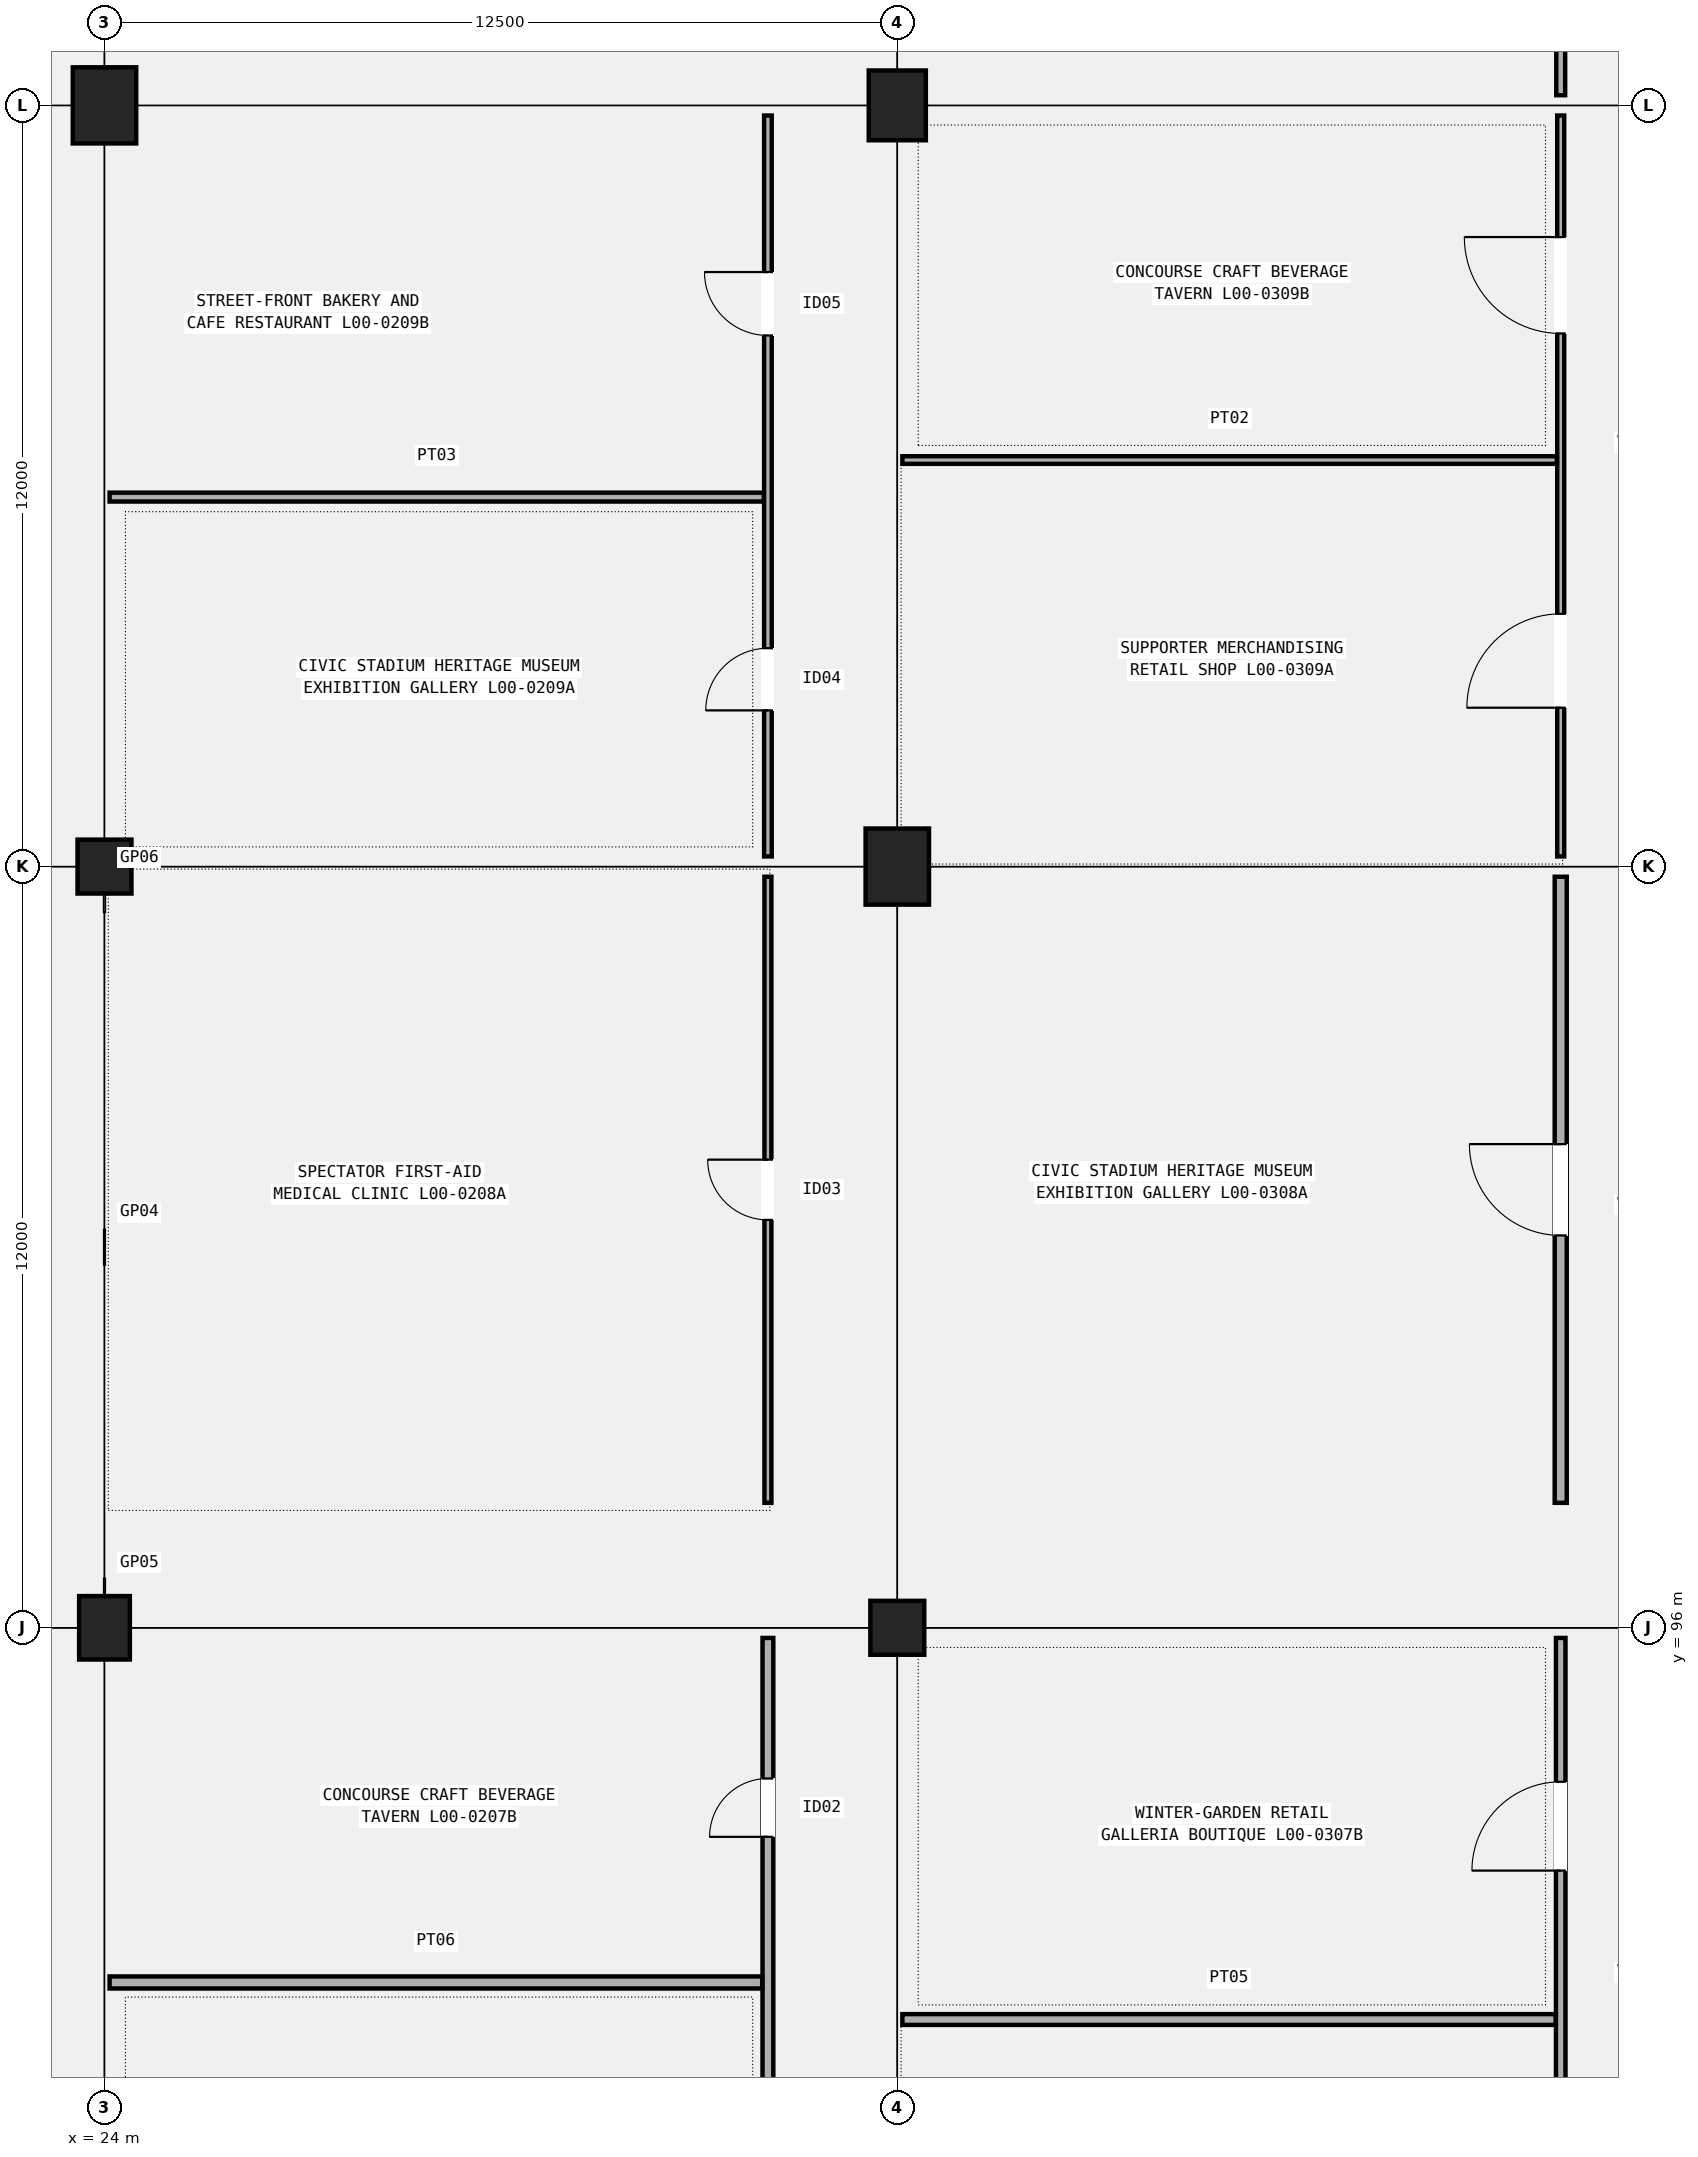
"""IFC4 building model, lengths in metres.
Left out: names, types, materials, properties, quantities, classifications, styles, units other than length and angle.
Written with IfcOpenShell. Run it as: python <this file> out.ifc"""

import sys

from ifc_helpers import new_model, si_unit, direction, frame, frame_2d, origin, origin_2d, place, context, subcontext, project, spatial, rectangle, circle, extrude, element, fill, save


model = new_model("IFC4")
c1 = context("Model", 3, precision=1e-05, world=origin(), true_north=direction((0.0, 1.0)))
c2 = subcontext(c1, "Body", "Model", "MODEL_VIEW")
j1 = project(units=[si_unit("LENGTHUNIT", "METRE"), si_unit("PLANEANGLEUNIT", "RADIAN")], contexts=[c1])
p1 = place(None, origin())
s1 = spatial("IfcSite", under=j1, at=p1, CompositionType="ELEMENT")
p2 = place(p1, origin())
s2 = spatial("IfcBuilding", under=s1, at=p2, CompositionType="ELEMENT")
p3 = place(p2, origin())
s3 = spatial("IfcBuildingStorey", under=s2, at=p3, CompositionType="ELEMENT", Elevation=0.0)
p4 = place(p3, frame((24.0, 96.0, 0.0), z_axis=(0.0, 0.0, 1.0), x_axis=(1.0, 0.0, 0.0)))
e1 = element("IfcColumn", 1, at=p4, inside=s3, PredefinedType="COLUMN", context=c2, shape_type="SweptSolid", body=[
    extrude(rectangle(XDim=0.8, YDim=1.0, at=origin_2d()), origin(), (0.0, 0.0, 1.0), 5.4),
])
p5 = place(p3, frame((24.0, 108.0, 0.0), z_axis=(0.0, 0.0, 1.0), x_axis=(1.0, 0.0, 0.0)))
e2 = element("IfcColumn", 2, at=p5, inside=s3, PredefinedType="COLUMN", context=c2, shape_type="SweptSolid", body=[
    extrude(circle(Radius=0.425, at=origin_2d()), origin(), (0.0, 0.0, 1.0), 5.4),
])
p6 = place(p3, frame((24.0, 120.0, 0.0), z_axis=(0.0, 0.0, 1.0), x_axis=(1.0, 0.0, 0.0)))
e3 = element("IfcColumn", 3, at=p6, inside=s3, PredefinedType="COLUMN", context=c2, shape_type="SweptSolid", body=[
    extrude(rectangle(XDim=1.0, YDim=1.2, at=origin_2d()), origin(), (0.0, 0.0, 1.0), 5.4),
])
p7 = place(p3, frame((36.5, 96.0, 0.0), z_axis=(0.0, 0.0, 1.0), x_axis=(1.0, 0.0, 0.0)))
e4 = element("IfcColumn", 4, at=p7, inside=s3, PredefinedType="COLUMN", context=c2, shape_type="SweptSolid", body=[
    extrude(circle(Radius=0.425, at=origin_2d()), origin(), (0.0, 0.0, 1.0), 5.4),
])
p8 = place(p3, frame((36.5, 108.0, 0.0), z_axis=(0.0, 0.0, 1.0), x_axis=(1.0, 0.0, 0.0)))
e5 = element("IfcColumn", 5, at=p8, inside=s3, PredefinedType="COLUMN", context=c2, shape_type="SweptSolid", body=[
    extrude(rectangle(XDim=1.0, YDim=1.2, at=origin_2d()), origin(), (0.0, 0.0, 1.0), 5.4),
])
p9 = place(p3, frame((36.5, 120.0, 0.0), z_axis=(0.0, 0.0, 1.0), x_axis=(1.0, 0.0, 0.0)))
e6 = element("IfcColumn", 6, at=p9, inside=s3, PredefinedType="COLUMN", context=c2, shape_type="SweptSolid", body=[
    extrude(rectangle(XDim=0.9, YDim=1.1, at=origin_2d()), origin(), (0.0, 0.0, 1.0), 5.4),
])
p10 = place(p3, frame((34.46, 84.16, 0.0), z_axis=(0.0, 0.0, 1.0), x_axis=(0.0, 1.0, 0.0)))
e7 = element("IfcWall", 7, at=p10, inside=s3, PredefinedType="PARTITIONING", context=c2, shape_type="SweptSolid", body=[
    extrude(rectangle(XDim=11.68, YDim=0.17, at=frame_2d((5.84, 0.0))), origin(), (0.0, 0.0, 1.0), 4.52),
])
p11 = place(p10, frame((2.635, 0.0, 0.0)))
e8 = element("IfcOpeningElement", 8, at=p11, cuts=e7, PredefinedType="OPENING", context=c2, shape_type="SweptSolid", body=[
    extrude(rectangle(XDim=0.9, YDim=2.06, at=frame_2d((0.45, 1.03))), frame((0.0, 0.095, 0.0), z_axis=(0.0, -1.0, 0.0), x_axis=(1.0, 0.0, 0.0)), (0.0, 0.0, 1.0), 0.19),
])
p12 = place(p10, frame((8.544, 0.0, 0.0)))
e9 = element("IfcOpeningElement", 9, at=p12, cuts=e7, PredefinedType="OPENING", context=c2, shape_type="SweptSolid", body=[
    extrude(rectangle(XDim=0.92, YDim=2.1, at=frame_2d((0.46, 1.05))), frame((0.0, 0.095, 0.0), z_axis=(0.0, -1.0, 0.0), x_axis=(1.0, 0.0, 0.0)), (0.0, 0.0, 1.0), 0.19),
])
p13 = place(p3, frame((24.08, 90.409, 0.0), z_axis=(0.0, 0.0, 1.0), x_axis=(1.0, 0.0, 0.0)))
e10 = element("IfcWall", 10, at=p13, inside=s3, PredefinedType="PARTITIONING", context=c2, shape_type="SweptSolid", body=[
    extrude(rectangle(XDim=10.29, YDim=0.19, at=frame_2d((5.145, 0.0))), origin(), (0.0, 0.0, 1.0), 4.52),
])
p14 = place(p3, frame((34.46, 97.97, 0.0), z_axis=(0.0, 0.0, 1.0), x_axis=(0.0, 1.0, 0.0)))
e11 = element("IfcWall", 11, at=p14, inside=s3, PredefinedType="PARTITIONING", context=c2, shape_type="SweptSolid", body=[
    extrude(rectangle(XDim=9.87, YDim=0.11, at=frame_2d((4.935, 0.0))), origin(), (0.0, 0.0, 1.0), 4.52),
])
p15 = place(p14, frame((4.46, 0.0, 0.0)))
e12 = element("IfcOpeningElement", 12, at=p15, cuts=e11, PredefinedType="OPENING", context=c2, shape_type="SweptSolid", body=[
    extrude(rectangle(XDim=0.95, YDim=2.12, at=frame_2d((0.475, 1.06))), frame((0.0, 0.065, 0.0), z_axis=(0.0, -1.0, 0.0), x_axis=(1.0, 0.0, 0.0)), (0.0, 0.0, 1.0), 0.13),
])
p16 = place(p3, frame((34.46, 108.16, 0.0), z_axis=(0.0, 0.0, 1.0), x_axis=(0.0, 1.0, 0.0)))
e13 = element("IfcWall", 13, at=p16, inside=s3, PredefinedType="PARTITIONING", context=c2, shape_type="SweptSolid", body=[
    extrude(rectangle(XDim=11.68, YDim=0.12, at=frame_2d((5.84, 0.0))), origin(), (0.0, 0.0, 1.0), 4.52),
])
p17 = place(p16, frame((2.302, 0.0, 0.0)))
e14 = element("IfcOpeningElement", 14, at=p17, cuts=e13, PredefinedType="OPENING", context=c2, shape_type="SweptSolid", body=[
    extrude(rectangle(XDim=0.98, YDim=2.1, at=frame_2d((0.49, 1.05))), frame((0.0, 0.07, 0.0), z_axis=(0.0, -1.0, 0.0), x_axis=(1.0, 0.0, 0.0)), (0.0, 0.0, 1.0), 0.14),
])
p18 = place(p16, frame((8.212, 0.0, 0.0)))
e15 = element("IfcOpeningElement", 15, at=p18, cuts=e13, PredefinedType="OPENING", context=c2, shape_type="SweptSolid", body=[
    extrude(rectangle(XDim=1.0, YDim=2.14, at=frame_2d((0.5, 1.07))), frame((0.0, 0.07, 0.0), z_axis=(0.0, -1.0, 0.0), x_axis=(1.0, 0.0, 0.0)), (0.0, 0.0, 1.0), 0.14),
])
p19 = place(p3, frame((24.08, 113.825, 0.0), z_axis=(0.0, 0.0, 1.0), x_axis=(1.0, 0.0, 0.0)))
e16 = element("IfcWall", 16, at=p19, inside=s3, PredefinedType="PARTITIONING", context=c2, shape_type="SweptSolid", body=[
    extrude(rectangle(XDim=10.315, YDim=0.14, at=frame_2d((5.157, 0.0))), origin(), (0.0, 0.0, 1.0), 4.52),
])
p20 = place(p3, frame((46.96, 84.16, 0.0), z_axis=(0.0, 0.0, 1.0), x_axis=(0.0, 1.0, 0.0)))
e17 = element("IfcWall", 17, at=p20, inside=s3, PredefinedType="PARTITIONING", context=c2, shape_type="SweptSolid", body=[
    extrude(rectangle(XDim=11.68, YDim=0.15, at=frame_2d((5.84, 0.0))), origin(), (0.0, 0.0, 1.0), 4.52),
])
p21 = place(p20, frame((2.112, 0.0, 0.0)))
e18 = element("IfcOpeningElement", 18, at=p21, cuts=e17, PredefinedType="OPENING", context=c2, shape_type="SweptSolid", body=[
    extrude(rectangle(XDim=1.36, YDim=2.25, at=frame_2d((0.68, 1.125))), frame((0.0, 0.085, 0.0), z_axis=(0.0, -1.0, 0.0), x_axis=(1.0, 0.0, 0.0)), (0.0, 0.0, 1.0), 0.17),
])
p22 = place(p20, frame((8.012, 0.0, 0.0)))
e19 = element("IfcOpeningElement", 19, at=p22, cuts=e17, PredefinedType="OPENING", context=c2, shape_type="SweptSolid", body=[
    extrude(rectangle(XDim=1.4, YDim=2.24, at=frame_2d((0.7, 1.12))), frame((0.0, 0.085, 0.0), z_axis=(0.0, -1.0, 0.0), x_axis=(1.0, 0.0, 0.0)), (0.0, 0.0, 1.0), 0.17),
])
p23 = place(p3, frame((36.58, 89.825, 0.0), z_axis=(0.0, 0.0, 1.0), x_axis=(1.0, 0.0, 0.0)))
e20 = element("IfcWall", 20, at=p23, inside=s3, PredefinedType="PARTITIONING", context=c2, shape_type="SweptSolid", body=[
    extrude(rectangle(XDim=10.3, YDim=0.17, at=frame_2d((5.15, 0.0))), origin(), (0.0, 0.0, 1.0), 4.52),
])
p24 = place(p3, frame((46.96, 97.97, 0.0), z_axis=(0.0, 0.0, 1.0), x_axis=(0.0, 1.0, 0.0)))
e21 = element("IfcWall", 21, at=p24, inside=s3, PredefinedType="PARTITIONING", context=c2, shape_type="SweptSolid", body=[
    extrude(rectangle(XDim=9.87, YDim=0.19, at=frame_2d((4.935, 0.0))), origin(), (0.0, 0.0, 1.0), 4.52),
])
p25 = place(p24, frame((4.215, 0.0, 0.0)))
e22 = element("IfcOpeningElement", 22, at=p25, cuts=e21, PredefinedType="OPENING", context=c2, shape_type="SweptSolid", body=[
    extrude(rectangle(XDim=1.44, YDim=2.26, at=frame_2d((0.72, 1.13))), frame((0.0, 0.105, 0.0), z_axis=(0.0, -1.0, 0.0), x_axis=(1.0, 0.0, 0.0)), (0.0, 0.0, 1.0), 0.21),
])
p26 = place(p3, frame((46.96, 108.16, 0.0), z_axis=(0.0, 0.0, 1.0), x_axis=(0.0, 1.0, 0.0)))
e23 = element("IfcWall", 23, at=p26, inside=s3, PredefinedType="PARTITIONING", context=c2, shape_type="SweptSolid", body=[
    extrude(rectangle(XDim=11.68, YDim=0.11, at=frame_2d((5.84, 0.0))), origin(), (0.0, 0.0, 1.0), 4.52),
])
p27 = place(p26, frame((2.344, 0.0, 0.0)))
e24 = element("IfcOpeningElement", 24, at=p27, cuts=e23, PredefinedType="OPENING", context=c2, shape_type="SweptSolid", body=[
    extrude(rectangle(XDim=1.48, YDim=2.24, at=frame_2d((0.74, 1.12))), frame((0.0, 0.065, 0.0), z_axis=(0.0, -1.0, 0.0), x_axis=(1.0, 0.0, 0.0)), (0.0, 0.0, 1.0), 0.13),
])
p28 = place(p26, frame((8.244, 0.0, 0.0)))
e25 = element("IfcOpeningElement", 25, at=p28, cuts=e23, PredefinedType="OPENING", context=c2, shape_type="SweptSolid", body=[
    extrude(rectangle(XDim=1.52, YDim=2.28, at=frame_2d((0.76, 1.14))), frame((0.0, 0.065, 0.0), z_axis=(0.0, -1.0, 0.0), x_axis=(1.0, 0.0, 0.0)), (0.0, 0.0, 1.0), 0.13),
])
p29 = place(p3, frame((36.58, 114.409, 0.0), z_axis=(0.0, 0.0, 1.0), x_axis=(1.0, 0.0, 0.0)))
e26 = element("IfcWall", 26, at=p29, inside=s3, PredefinedType="PARTITIONING", context=c2, shape_type="SweptSolid", body=[
    extrude(rectangle(XDim=10.32, YDim=0.12, at=frame_2d((5.16, 0.0))), origin(), (0.0, 0.0, 1.0), 4.52),
])
p30 = place(p3, frame((46.96, 120.16, 0.0), z_axis=(0.0, 0.0, 1.0), x_axis=(0.0, 1.0, 0.0)))
e27 = element("IfcWall", 27, at=p30, inside=s3, PredefinedType="PARTITIONING", context=c2, shape_type="SweptSolid", body=[
    extrude(rectangle(XDim=11.68, YDim=0.14, at=frame_2d((5.84, 0.0))), origin(), (0.0, 0.0, 1.0), 4.52),
])
p31 = place(p30, frame((5.06, 0.0, 0.0)))
e28 = element("IfcOpeningElement", 28, at=p31, cuts=e27, PredefinedType="OPENING", context=c2, shape_type="SweptSolid", body=[
    extrude(rectangle(XDim=1.56, YDim=2.26, at=frame_2d((0.78, 1.13))), frame((0.0, 0.08, 0.0), z_axis=(0.0, -1.0, 0.0), x_axis=(1.0, 0.0, 0.0)), (0.0, 0.0, 1.0), 0.16),
])
p32 = place(p12, origin())
e29 = element("IfcDoor", 29, at=p32, inside=s3, OperationType="SINGLE_SWING_LEFT", PredefinedType="DOOR", context=c2, shape_type="SweptSolid", body=[
    extrude(rectangle(XDim=0.92, YDim=2.1, at=frame_2d((0.46, 1.05))), frame((0.0, 0.025, 0.0), z_axis=(0.0, -1.0, 0.0), x_axis=(1.0, 0.0, 0.0)), (0.0, 0.0, 1.0), 0.05),
])
fill(e9, e29)
p33 = place(p15, origin())
e30 = element("IfcDoor", 30, at=p33, inside=s3, OperationType="SINGLE_SWING_RIGHT", PredefinedType="DOOR", context=c2, shape_type="SweptSolid", body=[
    extrude(rectangle(XDim=0.95, YDim=2.12, at=frame_2d((0.475, 1.06))), frame((0.0, 0.025, 0.0), z_axis=(0.0, -1.0, 0.0), x_axis=(1.0, 0.0, 0.0)), (0.0, 0.0, 1.0), 0.05),
])
fill(e12, e30)
p34 = place(p17, origin())
e31 = element("IfcDoor", 31, at=p34, inside=s3, OperationType="SINGLE_SWING_LEFT", PredefinedType="DOOR", context=c2, shape_type="SweptSolid", body=[
    extrude(rectangle(XDim=0.98, YDim=2.1, at=frame_2d((0.49, 1.05))), frame((0.0, 0.025, 0.0), z_axis=(0.0, -1.0, 0.0), x_axis=(1.0, 0.0, 0.0)), (0.0, 0.0, 1.0), 0.05),
])
fill(e14, e31)
p35 = place(p18, origin())
e32 = element("IfcDoor", 32, at=p35, inside=s3, OperationType="SINGLE_SWING_RIGHT", PredefinedType="DOOR", context=c2, shape_type="SweptSolid", body=[
    extrude(rectangle(XDim=1.0, YDim=2.14, at=frame_2d((0.5, 1.07))), frame((0.0, 0.025, 0.0), z_axis=(0.0, -1.0, 0.0), x_axis=(1.0, 0.0, 0.0)), (0.0, 0.0, 1.0), 0.05),
])
fill(e15, e32)
p36 = place(p22, origin())
e33 = element("IfcDoor", 33, at=p36, inside=s3, OperationType="SINGLE_SWING_LEFT", PredefinedType="DOOR", context=c2, shape_type="SweptSolid", body=[
    extrude(rectangle(XDim=1.4, YDim=2.24, at=frame_2d((0.7, 1.12))), frame((0.0, 0.025, 0.0), z_axis=(0.0, -1.0, 0.0), x_axis=(1.0, 0.0, 0.0)), (0.0, 0.0, 1.0), 0.05),
])
fill(e19, e33)
p37 = place(p25, origin())
e34 = element("IfcDoor", 34, at=p37, inside=s3, OperationType="SINGLE_SWING_RIGHT", PredefinedType="DOOR", context=c2, shape_type="SweptSolid", body=[
    extrude(rectangle(XDim=1.44, YDim=2.26, at=frame_2d((0.72, 1.13))), frame((0.0, 0.025, 0.0), z_axis=(0.0, -1.0, 0.0), x_axis=(1.0, 0.0, 0.0)), (0.0, 0.0, 1.0), 0.05),
])
fill(e22, e34)
p38 = place(p27, origin())
e35 = element("IfcDoor", 35, at=p38, inside=s3, OperationType="SINGLE_SWING_LEFT", PredefinedType="DOOR", context=c2, shape_type="SweptSolid", body=[
    extrude(rectangle(XDim=1.48, YDim=2.24, at=frame_2d((0.74, 1.12))), frame((0.0, 0.025, 0.0), z_axis=(0.0, -1.0, 0.0), x_axis=(1.0, 0.0, 0.0)), (0.0, 0.0, 1.0), 0.05),
])
fill(e24, e35)
p39 = place(p28, origin())
e36 = element("IfcDoor", 36, at=p39, inside=s3, OperationType="SINGLE_SWING_RIGHT", PredefinedType="DOOR", context=c2, shape_type="SweptSolid", body=[
    extrude(rectangle(XDim=1.52, YDim=2.28, at=frame_2d((0.76, 1.14))), frame((0.0, 0.025, 0.0), z_axis=(0.0, -1.0, 0.0), x_axis=(1.0, 0.0, 0.0)), (0.0, 0.0, 1.0), 0.05),
])
fill(e25, e36)
save(model, sys.argv[1])
